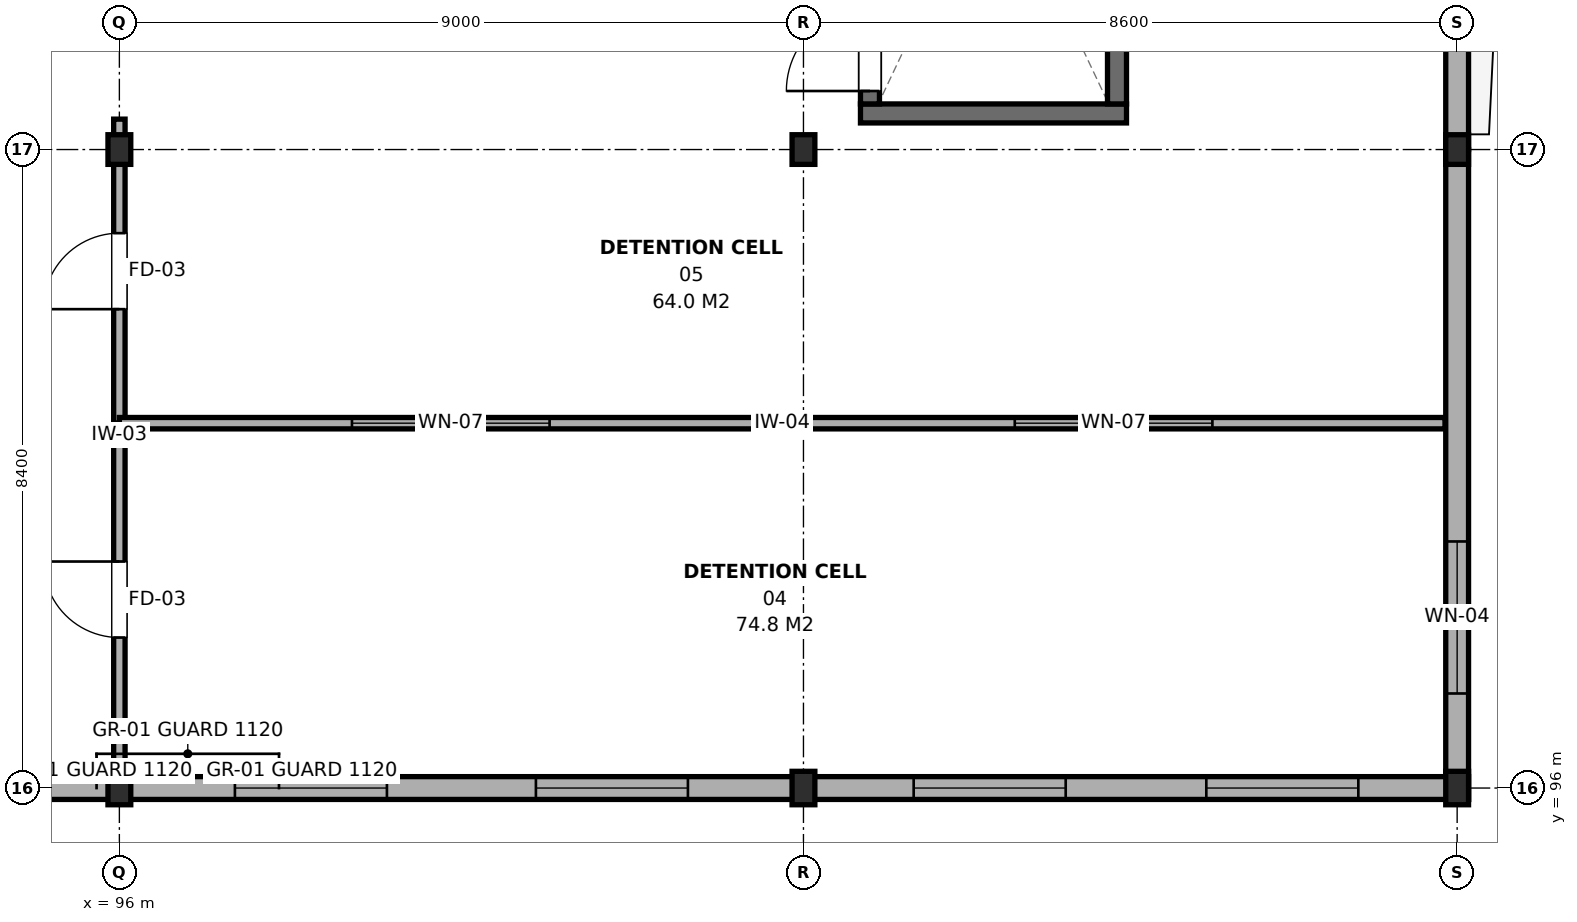
"""IFC4 building model, lengths in metres.
Left out: names, types, materials, properties, quantities, classifications, styles, units other than length and angle.
Written with IfcOpenShell. Run it as: python <this file> out.ifc"""

import sys

from ifc_helpers import new_model, si_unit, direction, frame, frame_2d, origin, origin_2d, place, context, subcontext, project, spatial, rectangle, i_section, extrude, element, fill, save


model = new_model("IFC4")
c1 = context("Model", 3, precision=1e-05, world=origin(), true_north=direction((0.0, 1.0)))
c2 = subcontext(c1, "Body", "Model", "MODEL_VIEW")
j1 = project(units=[si_unit("LENGTHUNIT", "METRE"), si_unit("PLANEANGLEUNIT", "RADIAN")], contexts=[c1])
p1 = place(None, origin())
s1 = spatial("IfcSite", under=j1, at=p1, CompositionType="ELEMENT")
p2 = place(p1, origin())
s2 = spatial("IfcBuilding", under=s1, at=p2, CompositionType="ELEMENT")
p3 = place(p2, frame((0.0, 0.0, 4.8)))
s3 = spatial("IfcBuildingStorey", under=s2, at=p3, CompositionType="ELEMENT", Elevation=4.8)
p4 = place(p3, frame((96.0, 96.0, 0.0), z_axis=(0.0, 0.0, 1.0), x_axis=(1.0, 0.0, 0.0)))
e1 = element("IfcColumn", 1, at=p4, inside=s3, PredefinedType="COLUMN", context=c2, shape_type="SweptSolid", body=[
    extrude(i_section(OverallWidth=0.3, OverallDepth=0.44, WebThickness=0.011, FlangeThickness=0.021, FilletRadius=0.027, at=origin_2d()), origin(), (0.0, 0.0, 1.0), 4.2),
])
p5 = place(p3, frame((96.0, 104.4, 0.0), z_axis=(0.0, 0.0, 1.0), x_axis=(1.0, 0.0, 0.0)))
e2 = element("IfcColumn", 2, at=p5, inside=s3, PredefinedType="COLUMN", context=c2, shape_type="SweptSolid", body=[
    extrude(i_section(OverallWidth=0.3, OverallDepth=0.39, WebThickness=0.011, FlangeThickness=0.019, FilletRadius=0.027, at=origin_2d()), origin(), (0.0, 0.0, 1.0), 4.2),
])
p6 = place(p3, frame((105.0, 96.0, 0.0), z_axis=(0.0, 0.0, 1.0), x_axis=(1.0, 0.0, 0.0)))
e3 = element("IfcColumn", 3, at=p6, inside=s3, PredefinedType="COLUMN", context=c2, shape_type="SweptSolid", body=[
    extrude(i_section(OverallWidth=0.3, OverallDepth=0.44, WebThickness=0.011, FlangeThickness=0.021, FilletRadius=0.027, at=origin_2d()), origin(), (0.0, 0.0, 1.0), 4.2),
])
p7 = place(p3, frame((105.0, 104.4, 0.0), z_axis=(0.0, 0.0, 1.0), x_axis=(1.0, 0.0, 0.0)))
e4 = element("IfcColumn", 4, at=p7, inside=s3, PredefinedType="COLUMN", context=c2, shape_type="SweptSolid", body=[
    extrude(i_section(OverallWidth=0.3, OverallDepth=0.39, WebThickness=0.011, FlangeThickness=0.019, FilletRadius=0.027, at=origin_2d()), origin(), (0.0, 0.0, 1.0), 4.2),
])
p8 = place(p3, frame((113.6, 96.0, 0.0), z_axis=(0.0, 0.0, 1.0), x_axis=(1.0, 0.0, 0.0)))
e5 = element("IfcColumn", 5, at=p8, inside=s3, PredefinedType="COLUMN", context=c2, shape_type="SweptSolid", body=[
    extrude(i_section(OverallWidth=0.3, OverallDepth=0.44, WebThickness=0.011, FlangeThickness=0.021, FilletRadius=0.027, at=origin_2d()), origin(), (0.0, 0.0, 1.0), 4.2),
])
p9 = place(p3, frame((113.6, 104.4, 0.0), z_axis=(0.0, 0.0, 1.0), x_axis=(1.0, 0.0, 0.0)))
e6 = element("IfcColumn", 6, at=p9, inside=s3, PredefinedType="COLUMN", context=c2, shape_type="SweptSolid", body=[
    extrude(i_section(OverallWidth=0.3, OverallDepth=0.39, WebThickness=0.011, FlangeThickness=0.019, FilletRadius=0.027, at=origin_2d()), origin(), (0.0, 0.0, 1.0), 4.2),
])
p10 = place(p3, frame((105.75, 104.875, 0.0), z_axis=(0.0, 0.0, 1.0), x_axis=(1.0, 0.0, 0.0)))
e7 = element("IfcWall", 7, at=p10, inside=s3, PredefinedType="SHEAR", context=c2, shape_type="SweptSolid", body=[
    extrude(rectangle(XDim=3.5, YDim=0.25, at=frame_2d((1.75, 0.0))), origin(), (0.0, 0.0, 1.0), 3.98),
])
p11 = place(p3, frame((105.875, 105.0, 0.0), z_axis=(0.0, 0.0, 1.0), x_axis=(0.0, 1.0, 0.0)))
e8 = element("IfcWall", 8, at=p11, inside=s3, PredefinedType="SHEAR", context=c2, shape_type="SweptSolid", body=[
    extrude(rectangle(XDim=6.4, YDim=0.25, at=frame_2d((3.2, 0.0))), origin(), (0.0, 0.0, 1.0), 3.98),
])
p12 = place(p11, frame((0.17, 0.0, 0.0)))
e9 = element("IfcOpeningElement", 9, at=p12, cuts=e8, PredefinedType="OPENING", context=c2, shape_type="SweptSolid", body=[
    extrude(rectangle(XDim=1.1, YDim=2.15, at=frame_2d((0.55, 1.075))), frame((0.0, 0.14, 0.0), z_axis=(0.0, -1.0, 0.0), x_axis=(1.0, 0.0, 0.0)), (0.0, 0.0, 1.0), 0.28),
])
p13 = place(p3, frame((109.125, 105.0, 0.0), z_axis=(0.0, 0.0, 1.0), x_axis=(0.0, 1.0, 0.0)))
e10 = element("IfcWall", 10, at=p13, inside=s3, PredefinedType="SHEAR", context=c2, shape_type="SweptSolid", body=[
    extrude(rectangle(XDim=6.4, YDim=0.25, at=frame_2d((3.2, 0.0))), origin(), (0.0, 0.0, 1.0), 3.98),
])
p14 = place(p3, frame((113.6, 95.85, 0.0), z_axis=(0.0, 0.0, 1.0), x_axis=(0.0, 1.0, 0.0)))
e11 = element("IfcWall", 11, at=p14, inside=s3, PredefinedType="SOLIDWALL", context=c2, shape_type="SweptSolid", body=[
    extrude(rectangle(XDim=8.55, YDim=0.3, at=frame_2d((4.275, 0.0))), origin(), (0.0, 0.0, 1.0), 3.435),
])
p15 = place(p14, frame((1.394, 0.0, 1.1)))
e12 = element("IfcOpeningElement", 12, at=p15, cuts=e11, PredefinedType="OPENING", context=c2, shape_type="SweptSolid", body=[
    extrude(rectangle(XDim=2.0, YDim=1.8, at=frame_2d((1.0, 0.9))), frame((0.0, 0.165, 0.0), z_axis=(0.0, -1.0, 0.0), x_axis=(1.0, 0.0, 0.0)), (0.0, 0.0, 1.0), 0.33),
])
p16 = place(p3, frame((113.6, 104.4, 0.0), z_axis=(0.0, 0.0, 1.0), x_axis=(0.0, 1.0, 0.0)))
e13 = element("IfcWall", 13, at=p16, inside=s3, PredefinedType="SOLIDWALL", context=c2, shape_type="SweptSolid", body=[
    extrude(rectangle(XDim=9.0, YDim=0.3, at=frame_2d((4.5, 0.0))), origin(), (0.0, 0.0, 1.0), 3.435),
])
p17 = place(p16, frame((1.52, 0.0, 1.1)))
e14 = element("IfcOpeningElement", 14, at=p17, cuts=e13, PredefinedType="OPENING", context=c2, shape_type="SweptSolid", body=[
    extrude(rectangle(XDim=2.0, YDim=1.8, at=frame_2d((1.0, 0.9))), frame((0.0, 0.165, 0.0), z_axis=(0.0, -1.0, 0.0), x_axis=(1.0, 0.0, 0.0)), (0.0, 0.0, 1.0), 0.33),
])
p18 = place(p16, frame((5.48, 0.0, 1.1)))
e15 = element("IfcOpeningElement", 15, at=p18, cuts=e13, PredefinedType="OPENING", context=c2, shape_type="SweptSolid", body=[
    extrude(rectangle(XDim=2.0, YDim=1.8, at=frame_2d((1.0, 0.9))), frame((0.0, 0.165, 0.0), z_axis=(0.0, -1.0, 0.0), x_axis=(1.0, 0.0, 0.0)), (0.0, 0.0, 1.0), 0.33),
])
p19 = place(p3, frame((87.0, 96.0, 0.0), z_axis=(0.0, 0.0, 1.0), x_axis=(1.0, 0.0, 0.0)))
e16 = element("IfcWall", 16, at=p19, inside=s3, PredefinedType="SOLIDWALL", context=c2, shape_type="SweptSolid", body=[
    extrude(rectangle(XDim=9.0, YDim=0.3, at=frame_2d((4.5, 0.0))), origin(), (0.0, 0.0, 1.0), 3.435),
])
p20 = place(p19, frame((1.52, 0.0, 0.95)))
e17 = element("IfcOpeningElement", 17, at=p20, cuts=e16, PredefinedType="OPENING", context=c2, shape_type="SweptSolid", body=[
    extrude(rectangle(XDim=2.0, YDim=1.8, at=frame_2d((1.0, 0.9))), frame((0.0, 0.165, 0.0), z_axis=(0.0, -1.0, 0.0), x_axis=(1.0, 0.0, 0.0)), (0.0, 0.0, 1.0), 0.33),
])
p21 = place(p19, frame((5.48, 0.0, 0.95)))
e18 = element("IfcOpeningElement", 18, at=p21, cuts=e16, PredefinedType="OPENING", context=c2, shape_type="SweptSolid", body=[
    extrude(rectangle(XDim=2.0, YDim=1.8, at=frame_2d((1.0, 0.9))), frame((0.0, 0.165, 0.0), z_axis=(0.0, -1.0, 0.0), x_axis=(1.0, 0.0, 0.0)), (0.0, 0.0, 1.0), 0.33),
])
p22 = place(p3, frame((96.0, 96.0, 0.0), z_axis=(0.0, 0.0, 1.0), x_axis=(1.0, 0.0, 0.0)))
e19 = element("IfcWall", 19, at=p22, inside=s3, PredefinedType="SOLIDWALL", context=c2, shape_type="SweptSolid", body=[
    extrude(rectangle(XDim=9.0, YDim=0.3, at=frame_2d((4.5, 0.0))), origin(), (0.0, 0.0, 1.0), 3.485),
])
p23 = place(p22, frame((1.52, 0.0, 0.95)))
e20 = element("IfcOpeningElement", 20, at=p23, cuts=e19, PredefinedType="OPENING", context=c2, shape_type="SweptSolid", body=[
    extrude(rectangle(XDim=2.0, YDim=1.8, at=frame_2d((1.0, 0.9))), frame((0.0, 0.165, 0.0), z_axis=(0.0, -1.0, 0.0), x_axis=(1.0, 0.0, 0.0)), (0.0, 0.0, 1.0), 0.33),
])
p24 = place(p22, frame((5.48, 0.0, 0.95)))
e21 = element("IfcOpeningElement", 21, at=p24, cuts=e19, PredefinedType="OPENING", context=c2, shape_type="SweptSolid", body=[
    extrude(rectangle(XDim=2.0, YDim=1.8, at=frame_2d((1.0, 0.9))), frame((0.0, 0.165, 0.0), z_axis=(0.0, -1.0, 0.0), x_axis=(1.0, 0.0, 0.0)), (0.0, 0.0, 1.0), 0.33),
])
p25 = place(p3, frame((105.0, 96.0, 0.0), z_axis=(0.0, 0.0, 1.0), x_axis=(1.0, 0.0, 0.0)))
e22 = element("IfcWall", 22, at=p25, inside=s3, PredefinedType="SOLIDWALL", context=c2, shape_type="SweptSolid", body=[
    extrude(rectangle(XDim=8.75, YDim=0.3, at=frame_2d((4.375, 0.0))), origin(), (0.0, 0.0, 1.0), 3.535),
])
p26 = place(p25, frame((1.45, 0.0, 0.95)))
e23 = element("IfcOpeningElement", 23, at=p26, cuts=e22, PredefinedType="OPENING", context=c2, shape_type="SweptSolid", body=[
    extrude(rectangle(XDim=2.0, YDim=1.8, at=frame_2d((1.0, 0.9))), frame((0.0, 0.165, 0.0), z_axis=(0.0, -1.0, 0.0), x_axis=(1.0, 0.0, 0.0)), (0.0, 0.0, 1.0), 0.33),
])
p27 = place(p25, frame((5.3, 0.0, 0.95)))
e24 = element("IfcOpeningElement", 24, at=p27, cuts=e22, PredefinedType="OPENING", context=c2, shape_type="SweptSolid", body=[
    extrude(rectangle(XDim=2.0, YDim=1.8, at=frame_2d((1.0, 0.9))), frame((0.0, 0.165, 0.0), z_axis=(0.0, -1.0, 0.0), x_axis=(1.0, 0.0, 0.0)), (0.0, 0.0, 1.0), 0.33),
])
p28 = place(p3, frame((96.0, 96.16, 0.0), z_axis=(0.0, 0.0, 1.0), x_axis=(0.0, 1.0, 0.0)))
e25 = element("IfcWall", 25, at=p28, inside=s3, PredefinedType="PARTITIONING", context=c2, shape_type="SweptSolid", body=[
    extrude(rectangle(XDim=4.64, YDim=0.15, at=frame_2d((2.32, 0.0))), origin(), (0.0, 0.0, 1.0), 3.435),
])
p29 = place(p28, frame((1.82, 0.0, 0.0)))
e26 = element("IfcOpeningElement", 26, at=p29, cuts=e25, PredefinedType="OPENING", context=c2, shape_type="SweptSolid", body=[
    extrude(rectangle(XDim=1.0, YDim=2.15, at=frame_2d((0.5, 1.075))), frame((0.0, 0.09, 0.0), z_axis=(0.0, -1.0, 0.0), x_axis=(1.0, 0.0, 0.0)), (0.0, 0.0, 1.0), 0.18),
])
p30 = place(p3, frame((96.0, 100.8, 0.0), z_axis=(0.0, 0.0, 1.0), x_axis=(0.0, 1.0, 0.0)))
e27 = element("IfcWall", 27, at=p30, inside=s3, PredefinedType="PARTITIONING", context=c2, shape_type="SweptSolid", body=[
    extrude(rectangle(XDim=4.0, YDim=0.15, at=frame_2d((2.0, 0.0))), origin(), (0.0, 0.0, 1.0), 3.435),
])
p31 = place(p30, frame((1.5, 0.0, 0.0)))
e28 = element("IfcOpeningElement", 28, at=p31, cuts=e27, PredefinedType="OPENING", context=c2, shape_type="SweptSolid", body=[
    extrude(rectangle(XDim=1.0, YDim=2.15, at=frame_2d((0.5, 1.075))), frame((0.0, 0.09, 0.0), z_axis=(0.0, -1.0, 0.0), x_axis=(1.0, 0.0, 0.0)), (0.0, 0.0, 1.0), 0.18),
])
p32 = place(p3, frame((96.0, 100.8, 0.0), z_axis=(0.0, 0.0, 1.0), x_axis=(1.0, 0.0, 0.0)))
e29 = element("IfcWall", 29, at=p32, inside=s3, PredefinedType="PARTITIONING", context=c2, shape_type="SweptSolid", body=[
    extrude(rectangle(XDim=17.44, YDim=0.15, at=frame_2d((8.72, 0.0))), origin(), (0.0, 0.0, 1.0), 3.435),
])
p33 = place(p32, frame((3.06, 0.0, 0.95)))
e30 = element("IfcOpeningElement", 30, at=p33, cuts=e29, PredefinedType="OPENING", context=c2, shape_type="SweptSolid", body=[
    extrude(rectangle(XDim=2.6, YDim=1.5, at=frame_2d((1.3, 0.75))), frame((0.0, 0.09, 0.0), z_axis=(0.0, -1.0, 0.0), x_axis=(1.0, 0.0, 0.0)), (0.0, 0.0, 1.0), 0.18),
])
p34 = place(p32, frame((11.78, 0.0, 0.95)))
e31 = element("IfcOpeningElement", 31, at=p34, cuts=e29, PredefinedType="OPENING", context=c2, shape_type="SweptSolid", body=[
    extrude(rectangle(XDim=2.6, YDim=1.5, at=frame_2d((1.3, 0.75))), frame((0.0, 0.09, 0.0), z_axis=(0.0, -1.0, 0.0), x_axis=(1.0, 0.0, 0.0)), (0.0, 0.0, 1.0), 0.18),
])
p35 = place(p15, origin())
e32 = element("IfcWindow", 32, at=p35, inside=s3, PartitioningType="SINGLE_PANEL", PredefinedType="WINDOW", context=c2, shape_type="SweptSolid", body=[
    extrude(rectangle(XDim=2.0, YDim=1.8, at=frame_2d((1.0, 0.9))), frame((0.0, 0.03, 0.0), z_axis=(0.0, -1.0, 0.0), x_axis=(1.0, 0.0, 0.0)), (0.0, 0.0, 1.0), 0.06),
])
fill(e12, e32)
p36 = place(p23, origin())
e33 = element("IfcWindow", 33, at=p36, inside=s3, PartitioningType="SINGLE_PANEL", PredefinedType="WINDOW", context=c2, shape_type="SweptSolid", body=[
    extrude(rectangle(XDim=2.0, YDim=1.8, at=frame_2d((1.0, 0.9))), frame((0.0, 0.03, 0.0), z_axis=(0.0, -1.0, 0.0), x_axis=(1.0, 0.0, 0.0)), (0.0, 0.0, 1.0), 0.06),
])
fill(e20, e33)
p37 = place(p24, origin())
e34 = element("IfcWindow", 34, at=p37, inside=s3, PartitioningType="SINGLE_PANEL", PredefinedType="WINDOW", context=c2, shape_type="SweptSolid", body=[
    extrude(rectangle(XDim=2.0, YDim=1.8, at=frame_2d((1.0, 0.9))), frame((0.0, 0.03, 0.0), z_axis=(0.0, -1.0, 0.0), x_axis=(1.0, 0.0, 0.0)), (0.0, 0.0, 1.0), 0.06),
])
fill(e21, e34)
p38 = place(p26, origin())
e35 = element("IfcWindow", 35, at=p38, inside=s3, PartitioningType="SINGLE_PANEL", PredefinedType="WINDOW", context=c2, shape_type="SweptSolid", body=[
    extrude(rectangle(XDim=2.0, YDim=1.8, at=frame_2d((1.0, 0.9))), frame((0.0, 0.03, 0.0), z_axis=(0.0, -1.0, 0.0), x_axis=(1.0, 0.0, 0.0)), (0.0, 0.0, 1.0), 0.06),
])
fill(e23, e35)
p39 = place(p27, origin())
e36 = element("IfcWindow", 36, at=p39, inside=s3, PartitioningType="SINGLE_PANEL", PredefinedType="WINDOW", context=c2, shape_type="SweptSolid", body=[
    extrude(rectangle(XDim=2.0, YDim=1.8, at=frame_2d((1.0, 0.9))), frame((0.0, 0.03, 0.0), z_axis=(0.0, -1.0, 0.0), x_axis=(1.0, 0.0, 0.0)), (0.0, 0.0, 1.0), 0.06),
])
fill(e24, e36)
p40 = place(p12, origin())
e37 = element("IfcDoor", 37, at=p40, inside=s3, OperationType="SINGLE_SWING_LEFT", PredefinedType="DOOR", context=c2, shape_type="SweptSolid", body=[
    extrude(rectangle(XDim=1.1, YDim=2.15, at=frame_2d((0.55, 1.075))), frame((0.0, 0.025, 0.0), z_axis=(0.0, -1.0, 0.0), x_axis=(1.0, 0.0, 0.0)), (0.0, 0.0, 1.0), 0.05),
])
fill(e9, e37)
p41 = place(p29, origin())
e38 = element("IfcDoor", 38, at=p41, inside=s3, OperationType="SINGLE_SWING_RIGHT", PredefinedType="DOOR", context=c2, shape_type="SweptSolid", body=[
    extrude(rectangle(XDim=1.0, YDim=2.15, at=frame_2d((0.5, 1.075))), frame((0.0, 0.025, 0.0), z_axis=(0.0, -1.0, 0.0), x_axis=(1.0, 0.0, 0.0)), (0.0, 0.0, 1.0), 0.05),
])
fill(e26, e38)
p42 = place(p31, origin())
e39 = element("IfcDoor", 39, at=p42, inside=s3, OperationType="SINGLE_SWING_LEFT", PredefinedType="DOOR", context=c2, shape_type="SweptSolid", body=[
    extrude(rectangle(XDim=1.0, YDim=2.15, at=frame_2d((0.5, 1.075))), frame((0.0, 0.025, 0.0), z_axis=(0.0, -1.0, 0.0), x_axis=(1.0, 0.0, 0.0)), (0.0, 0.0, 1.0), 0.05),
])
fill(e28, e39)
p43 = place(p33, origin())
e40 = element("IfcWindow", 40, at=p43, inside=s3, PartitioningType="SINGLE_PANEL", PredefinedType="WINDOW", context=c2, shape_type="SweptSolid", body=[
    extrude(rectangle(XDim=2.6, YDim=1.5, at=frame_2d((1.3, 0.75))), frame((0.0, 0.03, 0.0), z_axis=(0.0, -1.0, 0.0), x_axis=(1.0, 0.0, 0.0)), (0.0, 0.0, 1.0), 0.06),
])
fill(e30, e40)
p44 = place(p34, origin())
e41 = element("IfcWindow", 41, at=p44, inside=s3, PartitioningType="SINGLE_PANEL", PredefinedType="WINDOW", context=c2, shape_type="SweptSolid", body=[
    extrude(rectangle(XDim=2.6, YDim=1.5, at=frame_2d((1.3, 0.75))), frame((0.0, 0.03, 0.0), z_axis=(0.0, -1.0, 0.0), x_axis=(1.0, 0.0, 0.0)), (0.0, 0.0, 1.0), 0.06),
])
fill(e31, e41)
save(model, sys.argv[1])
